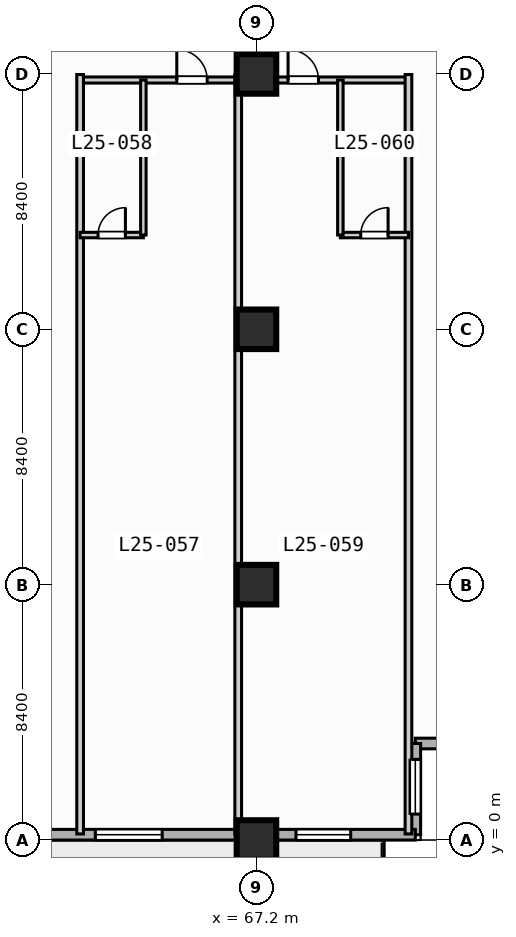
"""IFC4 building model, lengths in metres.
Left out: names, types, materials, properties, quantities, classifications, styles, units other than length and angle.
Written with IfcOpenShell. Run it as: python <this file> out.ifc"""

import sys

from ifc_helpers import new_model, si_unit, direction, frame, frame_2d, origin, origin_2d, place, context, subcontext, project, spatial, rectangle, extrude, element, fill, save


model = new_model("IFC4")
c1 = context("Model", 3, precision=1e-05, world=origin(), true_north=direction((0.0, 1.0)))
c2 = subcontext(c1, "Body", "Model", "MODEL_VIEW")
j1 = project(units=[si_unit("LENGTHUNIT", "METRE"), si_unit("PLANEANGLEUNIT", "RADIAN")], contexts=[c1])
p1 = place(None, origin())
s1 = spatial("IfcSite", under=j1, at=p1, CompositionType="ELEMENT")
p2 = place(p1, origin())
s2 = spatial("IfcBuilding", under=s1, at=p2, CompositionType="ELEMENT")
p3 = place(p2, frame((0.0, 0.0, 107.6)))
s3 = spatial("IfcBuildingStorey", under=s2, at=p3, CompositionType="ELEMENT", Elevation=107.6)
for number, where, z_axis, x_axis in (
    (1, (67.2, 0.0, 0.0), (0.0, 0.0, 1.0), (1.0, 0.0, 0.0)),
    (2, (67.2, 8.4, 0.0), (0.0, 0.0, 1.0), (1.0, 0.0, 0.0)),
    (3, (67.2, 16.8, 0.0), (0.0, 0.0, 1.0), (1.0, 0.0, 0.0)),
    (4, (67.2, 25.2, 0.0), (0.0, 0.0, 1.0), (1.0, 0.0, 0.0)),
):
    element("IfcColumn", number, at=place(p3, frame(where, z_axis=z_axis, x_axis=x_axis)), inside=s3, PredefinedType="COLUMN", context=c2, shape_type="SweptSolid", body=[
        extrude(rectangle(XDim=1.3, YDim=1.3, at=origin_2d()), origin(), (0.0, 0.0, 1.0), 3.8),
    ])
p4 = place(p3, frame((75.425, 3.175, 0.0), z_axis=(0.0, 0.0, 1.0), x_axis=(-1.0, 0.0, 0.0)))
e5 = element("IfcWall", 5, at=p4, inside=s3, PredefinedType="STANDARD", context=c2, shape_type="SweptSolid", body=[
    extrude(rectangle(XDim=3.0, YDim=0.35, at=frame_2d((1.5, 0.0))), origin(), (0.0, 0.0, 1.0), 3.55),
])
p5 = place(p3, frame((72.425, 3.175, 0.0), z_axis=(0.0, 0.0, 1.0), x_axis=(0.0, -1.0, 0.0)))
e6 = element("IfcWall", 6, at=p5, inside=s3, PredefinedType="STANDARD", context=c2, shape_type="SweptSolid", body=[
    extrude(rectangle(XDim=3.0, YDim=0.35, at=frame_2d((1.5, 0.0))), origin(), (0.0, 0.0, 1.0), 3.55),
])
p6 = place(p5, frame((0.522, 0.0, 0.85)))
e7 = element("IfcOpeningElement", 7, at=p6, cuts=e6, PredefinedType="OPENING", context=c2, shape_type="SweptSolid", body=[
    extrude(rectangle(XDim=1.8, YDim=1.8, at=frame_2d((0.9, 0.9))), frame((0.0, 0.185, 0.0), z_axis=(0.0, -1.0, 0.0), x_axis=(1.0, 0.0, 0.0)), (0.0, 0.0, 1.0), 0.37),
])
p7 = place(p3, frame((72.425, 0.175, 0.0), z_axis=(0.0, 0.0, 1.0), x_axis=(-1.0, 0.0, 0.0)))
e8 = element("IfcWall", 8, at=p7, inside=s3, PredefinedType="STANDARD", context=c2, shape_type="SweptSolid", body=[
    extrude(rectangle(XDim=69.25, YDim=0.35, at=frame_2d((34.625, 0.0))), origin(), (0.0, 0.0, 1.0), 3.55),
])
p8 = place(p7, frame((50.225, 0.0, 0.0)))
e9 = element("IfcOpeningElement", 9, at=p8, cuts=e8, PredefinedType="OPENING", context=c2, shape_type="SweptSolid", body=[
    extrude(rectangle(XDim=1.4, YDim=2.2, at=frame_2d((0.7, 1.1))), frame((0.0, 0.185, 0.0), z_axis=(0.0, -1.0, 0.0), x_axis=(1.0, 0.0, 0.0)), (0.0, 0.0, 1.0), 0.37),
])
p9 = place(p7, frame((33.525, 0.0, 0.85)))
e10 = element("IfcOpeningElement", 10, at=p9, cuts=e8, PredefinedType="OPENING", context=c2, shape_type="SweptSolid", body=[
    extrude(rectangle(XDim=2.2, YDim=1.8, at=frame_2d((1.1, 0.9))), frame((0.0, 0.185, 0.0), z_axis=(0.0, -1.0, 0.0), x_axis=(1.0, 0.0, 0.0)), (0.0, 0.0, 1.0), 0.37),
])
p10 = place(p7, frame((25.125, 0.0, 0.85)))
e11 = element("IfcOpeningElement", 11, at=p10, cuts=e8, PredefinedType="OPENING", context=c2, shape_type="SweptSolid", body=[
    extrude(rectangle(XDim=2.2, YDim=1.8, at=frame_2d((1.1, 0.9))), frame((0.0, 0.185, 0.0), z_axis=(0.0, -1.0, 0.0), x_axis=(1.0, 0.0, 0.0)), (0.0, 0.0, 1.0), 0.37),
])
p11 = place(p7, frame((8.325, 0.0, 0.85)))
e12 = element("IfcOpeningElement", 12, at=p11, cuts=e8, PredefinedType="OPENING", context=c2, shape_type="SweptSolid", body=[
    extrude(rectangle(XDim=2.2, YDim=1.8, at=frame_2d((1.1, 0.9))), frame((0.0, 0.185, 0.0), z_axis=(0.0, -1.0, 0.0), x_axis=(1.0, 0.0, 0.0)), (0.0, 0.0, 1.0), 0.37),
])
p12 = place(p7, frame((64.925, 0.0, 0.85)))
e13 = element("IfcOpeningElement", 13, at=p12, cuts=e8, PredefinedType="OPENING", context=c2, shape_type="SweptSolid", body=[
    extrude(rectangle(XDim=1.8, YDim=1.8, at=frame_2d((0.9, 0.9))), frame((0.0, 0.185, 0.0), z_axis=(0.0, -1.0, 0.0), x_axis=(1.0, 0.0, 0.0)), (0.0, 0.0, 1.0), 0.37),
])
p13 = place(p7, frame((56.525, 0.0, 0.85)))
e14 = element("IfcOpeningElement", 14, at=p13, cuts=e8, PredefinedType="OPENING", context=c2, shape_type="SweptSolid", body=[
    extrude(rectangle(XDim=1.8, YDim=1.8, at=frame_2d((0.9, 0.9))), frame((0.0, 0.185, 0.0), z_axis=(0.0, -1.0, 0.0), x_axis=(1.0, 0.0, 0.0)), (0.0, 0.0, 1.0), 0.37),
])
p14 = place(p7, frame((2.125, 0.0, 0.85)))
e15 = element("IfcOpeningElement", 15, at=p14, cuts=e8, PredefinedType="OPENING", context=c2, shape_type="SweptSolid", body=[
    extrude(rectangle(XDim=1.8, YDim=1.8, at=frame_2d((0.9, 0.9))), frame((0.0, 0.185, 0.0), z_axis=(0.0, -1.0, 0.0), x_axis=(1.0, 0.0, 0.0)), (0.0, 0.0, 1.0), 0.37),
])
p15 = place(p3, frame((61.4, 25.0, 0.0), z_axis=(0.0, 0.0, 1.0), x_axis=(1.0, 0.0, 0.0)))
e16 = element("IfcWall", 16, at=p15, inside=s3, PredefinedType="PARTITIONING", context=c2, shape_type="SweptSolid", body=[
    extrude(rectangle(XDim=10.8, YDim=0.2, at=frame_2d((5.4, 0.0))), origin(), (0.0, 0.0, 1.0), 2.8),
])
p16 = place(p15, frame((3.18, 0.0, 0.0)))
e17 = element("IfcOpeningElement", 17, at=p16, cuts=e16, PredefinedType="OPENING", context=c2, shape_type="SweptSolid", body=[
    extrude(rectangle(XDim=1.0, YDim=2.15, at=frame_2d((0.5, 1.075))), frame((0.0, 0.11, 0.0), z_axis=(0.0, -1.0, 0.0), x_axis=(1.0, 0.0, 0.0)), (0.0, 0.0, 1.0), 0.22),
])
p17 = place(p15, frame((6.84, 0.0, 0.0)))
e18 = element("IfcOpeningElement", 18, at=p17, cuts=e16, PredefinedType="OPENING", context=c2, shape_type="SweptSolid", body=[
    extrude(rectangle(XDim=1.0, YDim=2.15, at=frame_2d((0.5, 1.075))), frame((0.0, 0.11, 0.0), z_axis=(0.0, -1.0, 0.0), x_axis=(1.0, 0.0, 0.0)), (0.0, 0.0, 1.0), 0.22),
])
p18 = place(p3, frame((61.4, 0.2, 0.0), z_axis=(0.0, 0.0, 1.0), x_axis=(0.0, 1.0, 0.0)))
e19 = element("IfcWall", 19, at=p18, inside=s3, PredefinedType="PARTITIONING", context=c2, shape_type="SweptSolid", body=[
    extrude(rectangle(XDim=24.98, YDim=0.22, at=frame_2d((12.49, 0.0))), origin(), (0.0, 0.0, 1.0), 3.55),
])
p19 = place(p3, frame((61.4, 19.9, 0.0), z_axis=(0.0, 0.0, 1.0), x_axis=(1.0, 0.0, 0.0)))
e20 = element("IfcWall", 20, at=p19, inside=s3, PredefinedType="PLUMBINGWALL", context=c2, shape_type="SweptSolid", body=[
    extrude(rectangle(XDim=2.08, YDim=0.18, at=frame_2d((1.04, 0.0))), origin(), (0.0, 0.0, 1.0), 3.55),
])
p20 = place(p19, frame((0.59, 0.0, 0.0)))
e21 = element("IfcOpeningElement", 21, at=p20, cuts=e20, PredefinedType="OPENING", context=c2, shape_type="SweptSolid", body=[
    extrude(rectangle(XDim=0.9, YDim=2.1, at=frame_2d((0.45, 1.05))), frame((0.0, 0.1, 0.0), z_axis=(0.0, -1.0, 0.0), x_axis=(1.0, 0.0, 0.0)), (0.0, 0.0, 1.0), 0.2),
])
p21 = place(p3, frame((63.48, 19.9, 0.0), z_axis=(0.0, 0.0, 1.0), x_axis=(0.0, 1.0, 0.0)))
e22 = element("IfcWall", 22, at=p21, inside=s3, PredefinedType="PLUMBINGWALL", context=c2, shape_type="SweptSolid", body=[
    extrude(rectangle(XDim=5.1, YDim=0.18, at=frame_2d((2.55, 0.0))), origin(), (0.0, 0.0, 1.0), 3.55),
])
for number, where, z_axis, x_axis in (
    (23, (66.6, 0.2, 0.0), (0.0, 0.0, 1.0), (0.0, 1.0, 0.0)),
    (24, (72.2, 0.2, 0.0), (0.0, 0.0, 1.0), (0.0, 1.0, 0.0)),
):
    element("IfcWall", number, at=place(p3, frame(where, z_axis=z_axis, x_axis=x_axis)), inside=s3, PredefinedType="PARTITIONING", context=c2, shape_type="SweptSolid", body=[
        extrude(rectangle(XDim=24.98, YDim=0.22, at=frame_2d((12.49, 0.0))), origin(), (0.0, 0.0, 1.0), 3.55),
    ])
p22 = place(p3, frame((69.96, 19.9, 0.0), z_axis=(0.0, 0.0, 1.0), x_axis=(1.0, 0.0, 0.0)))
e25 = element("IfcWall", 25, at=p22, inside=s3, PredefinedType="PLUMBINGWALL", context=c2, shape_type="SweptSolid", body=[
    extrude(rectangle(XDim=2.24, YDim=0.18, at=frame_2d((1.12, 0.0))), origin(), (0.0, 0.0, 1.0), 3.55),
])
p23 = place(p22, frame((0.67, 0.0, 0.0)))
e26 = element("IfcOpeningElement", 26, at=p23, cuts=e25, PredefinedType="OPENING", context=c2, shape_type="SweptSolid", body=[
    extrude(rectangle(XDim=0.9, YDim=2.1, at=frame_2d((0.45, 1.05))), frame((0.0, 0.1, 0.0), z_axis=(0.0, -1.0, 0.0), x_axis=(1.0, 0.0, 0.0)), (0.0, 0.0, 1.0), 0.2),
])
p24 = place(p3, frame((69.96, 19.9, 0.0), z_axis=(0.0, 0.0, 1.0), x_axis=(0.0, 1.0, 0.0)))
e27 = element("IfcWall", 27, at=p24, inside=s3, PredefinedType="PLUMBINGWALL", context=c2, shape_type="SweptSolid", body=[
    extrude(rectangle(XDim=5.1, YDim=0.18, at=frame_2d((2.55, 0.0))), origin(), (0.0, 0.0, 1.0), 3.55),
])
p25 = place(p6, origin())
e28 = element("IfcWindow", 28, at=p25, inside=s3, PartitioningType="SINGLE_PANEL", PredefinedType="WINDOW", context=c2, shape_type="SweptSolid", body=[
    extrude(rectangle(XDim=1.8, YDim=1.8, at=frame_2d((0.9, 0.9))), frame((0.0, 0.03, 0.0), z_axis=(0.0, -1.0, 0.0), x_axis=(1.0, 0.0, 0.0)), (0.0, 0.0, 1.0), 0.06),
])
fill(e7, e28)
p26 = place(p11, origin())
e29 = element("IfcWindow", 29, at=p26, inside=s3, PartitioningType="SINGLE_PANEL", PredefinedType="WINDOW", context=c2, shape_type="SweptSolid", body=[
    extrude(rectangle(XDim=2.2, YDim=1.8, at=frame_2d((1.1, 0.9))), frame((0.0, 0.03, 0.0), z_axis=(0.0, -1.0, 0.0), x_axis=(1.0, 0.0, 0.0)), (0.0, 0.0, 1.0), 0.06),
])
fill(e12, e29)
p27 = place(p14, origin())
e30 = element("IfcWindow", 30, at=p27, inside=s3, PartitioningType="SINGLE_PANEL", PredefinedType="WINDOW", context=c2, shape_type="SweptSolid", body=[
    extrude(rectangle(XDim=1.8, YDim=1.8, at=frame_2d((0.9, 0.9))), frame((0.0, 0.03, 0.0), z_axis=(0.0, -1.0, 0.0), x_axis=(1.0, 0.0, 0.0)), (0.0, 0.0, 1.0), 0.06),
])
fill(e15, e30)
p28 = place(p16, origin())
e31 = element("IfcDoor", 31, at=p28, inside=s3, OperationType="SINGLE_SWING_LEFT", PredefinedType="DOOR", context=c2, shape_type="SweptSolid", body=[
    extrude(rectangle(XDim=1.0, YDim=2.15, at=frame_2d((0.5, 1.075))), frame((0.0, 0.025, 0.0), z_axis=(0.0, -1.0, 0.0), x_axis=(1.0, 0.0, 0.0)), (0.0, 0.0, 1.0), 0.05),
])
fill(e17, e31)
p29 = place(p17, origin())
e32 = element("IfcDoor", 32, at=p29, inside=s3, OperationType="SINGLE_SWING_LEFT", PredefinedType="DOOR", context=c2, shape_type="SweptSolid", body=[
    extrude(rectangle(XDim=1.0, YDim=2.15, at=frame_2d((0.5, 1.075))), frame((0.0, 0.025, 0.0), z_axis=(0.0, -1.0, 0.0), x_axis=(1.0, 0.0, 0.0)), (0.0, 0.0, 1.0), 0.05),
])
fill(e18, e32)
p30 = place(p20, origin())
e33 = element("IfcDoor", 33, at=p30, inside=s3, OperationType="SINGLE_SWING_RIGHT", PredefinedType="DOOR", context=c2, shape_type="SweptSolid", body=[
    extrude(rectangle(XDim=0.9, YDim=2.1, at=frame_2d((0.45, 1.05))), frame((0.0, 0.025, 0.0), z_axis=(0.0, -1.0, 0.0), x_axis=(1.0, 0.0, 0.0)), (0.0, 0.0, 1.0), 0.05),
])
fill(e21, e33)
p31 = place(p23, origin())
e34 = element("IfcDoor", 34, at=p31, inside=s3, OperationType="SINGLE_SWING_RIGHT", PredefinedType="DOOR", context=c2, shape_type="SweptSolid", body=[
    extrude(rectangle(XDim=0.9, YDim=2.1, at=frame_2d((0.45, 1.05))), frame((0.0, 0.025, 0.0), z_axis=(0.0, -1.0, 0.0), x_axis=(1.0, 0.0, 0.0)), (0.0, 0.0, 1.0), 0.05),
])
fill(e26, e34)
save(model, sys.argv[1])
